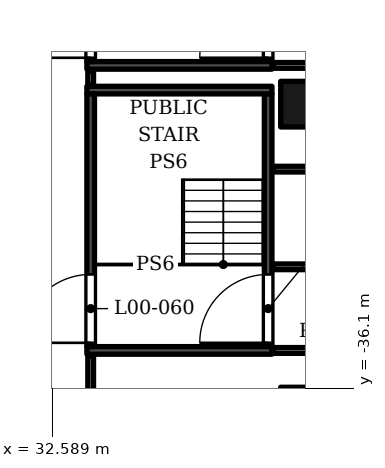
"""IFC4 building model, lengths in metres.
Left out: names, types, materials, properties, quantities, classifications, styles, units other than length and angle.
Written with IfcOpenShell. Run it as: python <this file> out.ifc"""

import sys

from ifc_helpers import new_model, si_unit, direction, frame, frame_2d, origin, origin_2d, place, context, subcontext, project, spatial, rectangle, extrude, element, fill, save


model = new_model("IFC4")
c1 = context("Model", 3, precision=1e-05, world=origin(), true_north=direction((0.0, 1.0)))
c2 = subcontext(c1, "Body", "Model", "MODEL_VIEW")
j1 = project(units=[si_unit("LENGTHUNIT", "METRE"), si_unit("PLANEANGLEUNIT", "RADIAN")], contexts=[c1])
p1 = place(None, origin())
s1 = spatial("IfcSite", under=j1, at=p1, CompositionType="ELEMENT")
p2 = place(p1, origin())
s2 = spatial("IfcBuilding", under=s1, at=p2, CompositionType="ELEMENT")
p3 = place(p2, origin())
s3 = spatial("IfcBuildingStorey", under=s2, at=p3, CompositionType="ELEMENT", Elevation=0.0)
for number, where, z_axis, x_axis in (
    (1, (39.2, -36.669, 0.0), (0.0, 0.0, 1.0), (1.0, 0.0, 0.0)),
    (2, (39.2, -28.62, 0.0), (0.0, 0.0, 1.0), (1.0, 0.0, 0.0)),
):
    element("IfcColumn", number, at=place(p3, frame(where, z_axis=z_axis, x_axis=x_axis)), inside=s3, PredefinedType="COLUMN", context=c2, shape_type="SweptSolid", body=[
        extrude(rectangle(XDim=1.2, YDim=1.2, at=origin_2d()), origin(), (0.0, 0.0, 1.0), 9.0),
    ])
for number, where, z_axis, x_axis in (
    (3, (33.5, -35.1, 0.0), (0.0, 0.0, 1.0), (1.0, 0.0, 0.0)),
    (4, (33.5, -28.25, 0.0), (0.0, 0.0, 1.0), (1.0, 0.0, 0.0)),
):
    element("IfcWall", number, at=place(p3, frame(where, z_axis=z_axis, x_axis=x_axis)), inside=s3, PredefinedType="SOLIDWALL", context=c2, shape_type="SweptSolid", body=[
        extrude(rectangle(XDim=4.87, YDim=0.2, at=frame_2d((2.435, 0.0))), origin(), (0.0, 0.0, 1.0), 8.5),
    ])
p4 = place(p3, frame((33.6, -35.0, 0.0), z_axis=(0.0, 0.0, 1.0), x_axis=(0.0, 1.0, 0.0)))
e5 = element("IfcWall", 5, at=p4, inside=s3, PredefinedType="SOLIDWALL", context=c2, shape_type="SweptSolid", body=[
    extrude(rectangle(XDim=6.65, YDim=0.2, at=frame_2d((3.325, 0.0))), origin(), (0.0, 0.0, 1.0), 8.5),
])
p5 = place(p4, frame((0.1, 0.0, 0.0)))
e6 = element("IfcOpeningElement", 6, at=p5, cuts=e5, PredefinedType="OPENING", context=c2, shape_type="SweptSolid", body=[
    extrude(rectangle(XDim=1.8, YDim=2.4, at=frame_2d((0.9, 1.2))), frame((0.0, 0.11, 0.0), z_axis=(0.0, -1.0, 0.0), x_axis=(1.0, 0.0, 0.0)), (0.0, 0.0, 1.0), 0.22),
])
p6 = place(p3, frame((38.27, -35.0, 0.0), z_axis=(0.0, 0.0, 1.0), x_axis=(0.0, 1.0, 0.0)))
e7 = element("IfcWall", 7, at=p6, inside=s3, PredefinedType="SOLIDWALL", context=c2, shape_type="SweptSolid", body=[
    extrude(rectangle(XDim=6.65, YDim=0.2, at=frame_2d((3.325, 0.0))), origin(), (0.0, 0.0, 1.0), 8.5),
])
p7 = place(p6, frame((0.1, 0.0, 0.0)))
e8 = element("IfcOpeningElement", 8, at=p7, cuts=e7, PredefinedType="OPENING", context=c2, shape_type="SweptSolid", body=[
    extrude(rectangle(XDim=1.8, YDim=2.4, at=frame_2d((0.9, 1.2))), frame((0.0, 0.11, 0.0), z_axis=(0.0, -1.0, 0.0), x_axis=(1.0, 0.0, 0.0)), (0.0, 0.0, 1.0), 0.22),
])
p8 = place(p3, frame((33.5, -27.6, 0.0), z_axis=(0.0, 0.0, 1.0), x_axis=(1.0, 0.0, 0.0)))
e9 = element("IfcWall", 9, at=p8, inside=s3, PredefinedType="SOLIDWALL", context=c2, shape_type="SweptSolid", body=[
    extrude(rectangle(XDim=4.87, YDim=0.2, at=frame_2d((2.435, 0.0))), origin(), (0.0, 0.0, 1.0), 8.5),
])
p9 = place(p3, frame((33.6, -27.5, 0.0), z_axis=(0.0, 0.0, 1.0), x_axis=(0.0, 1.0, 0.0)))
e10 = element("IfcWall", 10, at=p9, inside=s3, PredefinedType="SOLIDWALL", context=c2, shape_type="SweptSolid", body=[
    extrude(rectangle(XDim=6.65, YDim=0.2, at=frame_2d((3.325, 0.0))), origin(), (0.0, 0.0, 1.0), 8.5),
])
p10 = place(p9, frame((0.1, 0.0, 0.0)))
e11 = element("IfcOpeningElement", 11, at=p10, cuts=e10, PredefinedType="OPENING", context=c2, shape_type="SweptSolid", body=[
    extrude(rectangle(XDim=1.8, YDim=2.4, at=frame_2d((0.9, 1.2))), frame((0.0, 0.11, 0.0), z_axis=(0.0, -1.0, 0.0), x_axis=(1.0, 0.0, 0.0)), (0.0, 0.0, 1.0), 0.22),
])
p11 = place(p3, frame((38.27, -27.5, 0.0), z_axis=(0.0, 0.0, 1.0), x_axis=(0.0, 1.0, 0.0)))
e12 = element("IfcWall", 12, at=p11, inside=s3, PredefinedType="SOLIDWALL", context=c2, shape_type="SweptSolid", body=[
    extrude(rectangle(XDim=6.65, YDim=0.2, at=frame_2d((3.325, 0.0))), origin(), (0.0, 0.0, 1.0), 8.5),
])
p12 = place(p11, frame((0.1, 0.0, 0.0)))
e13 = element("IfcOpeningElement", 13, at=p12, cuts=e12, PredefinedType="OPENING", context=c2, shape_type="SweptSolid", body=[
    extrude(rectangle(XDim=1.8, YDim=2.4, at=frame_2d((0.9, 1.2))), frame((0.0, 0.11, 0.0), z_axis=(0.0, -1.0, 0.0), x_axis=(1.0, 0.0, 0.0)), (0.0, 0.0, 1.0), 0.22),
])
p13 = place(p3, frame((33.6, -44.6, 0.0), z_axis=(0.0, 0.0, 1.0), x_axis=(0.0, 1.0, 0.0)))
e14 = element("IfcWall", 14, at=p13, inside=s3, PredefinedType="PARTITIONING", context=c2, shape_type="SweptSolid", body=[
    extrude(rectangle(XDim=9.36, YDim=0.15, at=frame_2d((4.68, 0.0))), origin(), (0.0, 0.0, 1.0), 7.3),
])
p14 = place(p13, frame((6.68, 0.0, 0.0)))
e15 = element("IfcOpeningElement", 15, at=p14, cuts=e14, PredefinedType="OPENING", context=c2, shape_type="SweptSolid", body=[
    extrude(rectangle(XDim=1.2, YDim=2.1, at=frame_2d((0.6, 1.05))), frame((0.0, 0.085, 0.0), z_axis=(0.0, -1.0, 0.0), x_axis=(1.0, 0.0, 0.0)), (0.0, 0.0, 1.0), 0.17),
])
p15 = place(p3, frame((38.41, -35.101, 0.0), z_axis=(0.0, 0.0, 1.0), x_axis=(1.0, 0.0, 0.0)))
e16 = element("IfcWall", 16, at=p15, inside=s3, PredefinedType="PARTITIONING", context=c2, shape_type="SweptSolid", body=[
    extrude(rectangle(XDim=11.31, YDim=0.151, at=frame_2d((5.655, 0.0))), origin(), (0.0, 0.0, 1.0), 7.6),
])
p16 = place(p15, frame((5.04, 0.0, 0.0)))
e17 = element("IfcOpeningElement", 17, at=p16, cuts=e16, PredefinedType="OPENING", context=c2, shape_type="SweptSolid", body=[
    extrude(rectangle(XDim=1.2, YDim=2.1, at=frame_2d((0.6, 1.05))), frame((0.0, 0.085, 0.0), z_axis=(0.0, -1.0, 0.0), x_axis=(1.0, 0.0, 0.0)), (0.0, 0.0, 1.0), 0.171),
])
p17 = place(p3, frame((38.41, -32.9, 0.0), z_axis=(0.0, 0.0, 1.0), x_axis=(1.0, 0.0, 0.0)))
e18 = element("IfcWall", 18, at=p17, inside=s3, PredefinedType="PARTITIONING", context=c2, shape_type="SweptSolid", body=[
    extrude(rectangle(XDim=11.31, YDim=0.15, at=frame_2d((5.655, 0.0))), origin(), (0.0, 0.0, 1.0), 7.6),
])
p18 = place(p3, frame((38.41, -30.33, 0.0), z_axis=(0.0, 0.0, 1.0), x_axis=(1.0, 0.0, 0.0)))
e19 = element("IfcWall", 19, at=p18, inside=s3, PredefinedType="PARTITIONING", context=c2, shape_type="SweptSolid", body=[
    extrude(rectangle(XDim=2.19, YDim=0.15, at=frame_2d((1.095, 0.0))), origin(), (0.0, 0.0, 1.0), 8.5),
])
p19 = place(p3, frame((33.6, -28.11, 0.0), z_axis=(0.0, 0.0, 1.0), x_axis=(0.0, 1.0, 0.0)))
e20 = element("IfcWall", 20, at=p19, inside=s3, PredefinedType="PARTITIONING", context=c2, shape_type="SweptSolid", body=[
    extrude(rectangle(XDim=0.37, YDim=0.15, at=frame_2d((0.185, 0.0))), origin(), (0.0, 0.0, 1.0), 8.5),
])
p20 = place(p3, frame((38.41, -27.601, 0.0), z_axis=(0.0, 0.0, 1.0), x_axis=(1.0, 0.0, 0.0)))
e21 = element("IfcWall", 21, at=p20, inside=s3, PredefinedType="PARTITIONING", context=c2, shape_type="SweptSolid", body=[
    extrude(rectangle(XDim=11.31, YDim=0.151, at=frame_2d((5.655, 0.0))), origin(), (0.0, 0.0, 1.0), 7.6),
])
p21 = place(p20, frame((5.04, 0.0, 0.0)))
e22 = element("IfcOpeningElement", 22, at=p21, cuts=e21, PredefinedType="OPENING", context=c2, shape_type="SweptSolid", body=[
    extrude(rectangle(XDim=1.2, YDim=2.1, at=frame_2d((0.6, 1.05))), frame((0.0, 0.085, 0.0), z_axis=(0.0, -1.0, 0.0), x_axis=(1.0, 0.0, 0.0)), (0.0, 0.0, 1.0), 0.171),
])
p22 = place(p5, origin())
e23 = element("IfcDoor", 23, at=p22, inside=s3, OperationType="DOUBLE_DOOR_SINGLE_SWING", PredefinedType="DOOR", context=c2, shape_type="SweptSolid", body=[
    extrude(rectangle(XDim=1.8, YDim=2.4, at=frame_2d((0.9, 1.2))), frame((0.0, 0.025, 0.0), z_axis=(0.0, -1.0, 0.0), x_axis=(1.0, 0.0, 0.0)), (0.0, 0.0, 1.0), 0.05),
])
fill(e6, e23)
p23 = place(p7, origin())
e24 = element("IfcDoor", 24, at=p23, inside=s3, OperationType="DOUBLE_DOOR_SINGLE_SWING", PredefinedType="DOOR", context=c2, shape_type="SweptSolid", body=[
    extrude(rectangle(XDim=1.8, YDim=2.4, at=frame_2d((0.9, 1.2))), frame((0.0, 0.025, 0.0), z_axis=(0.0, -1.0, 0.0), x_axis=(1.0, 0.0, 0.0)), (0.0, 0.0, 1.0), 0.05),
])
fill(e8, e24)
p24 = place(p10, origin())
e25 = element("IfcDoor", 25, at=p24, inside=s3, OperationType="DOUBLE_DOOR_SINGLE_SWING", PredefinedType="DOOR", context=c2, shape_type="SweptSolid", body=[
    extrude(rectangle(XDim=1.8, YDim=2.4, at=frame_2d((0.9, 1.2))), frame((0.0, 0.025, 0.0), z_axis=(0.0, -1.0, 0.0), x_axis=(1.0, 0.0, 0.0)), (0.0, 0.0, 1.0), 0.05),
])
fill(e11, e25)
p25 = place(p12, origin())
e26 = element("IfcDoor", 26, at=p25, inside=s3, OperationType="DOUBLE_DOOR_SINGLE_SWING", PredefinedType="DOOR", context=c2, shape_type="SweptSolid", body=[
    extrude(rectangle(XDim=1.8, YDim=2.4, at=frame_2d((0.9, 1.2))), frame((0.0, 0.025, 0.0), z_axis=(0.0, -1.0, 0.0), x_axis=(1.0, 0.0, 0.0)), (0.0, 0.0, 1.0), 0.05),
])
fill(e13, e26)
save(model, sys.argv[1])
